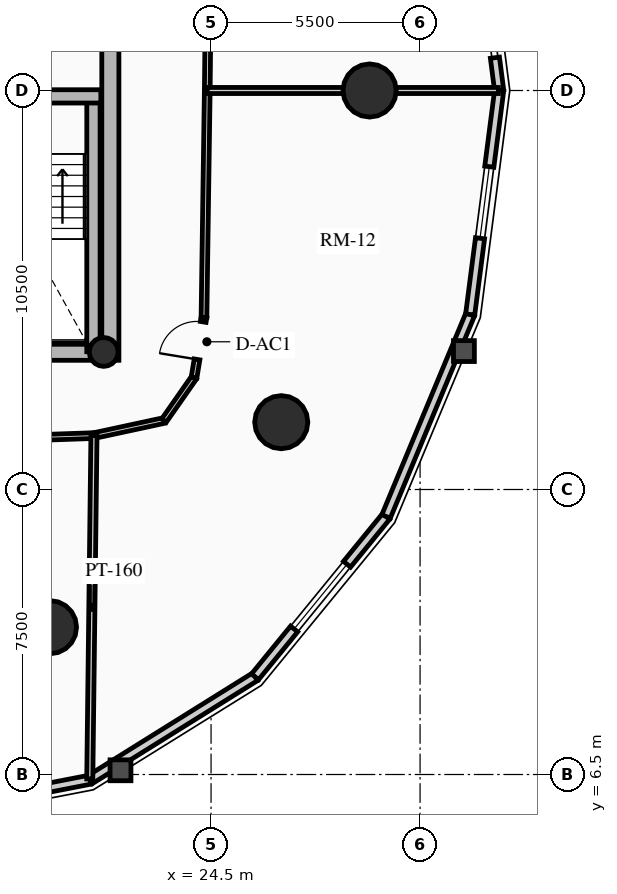
"""IFC4 building model, lengths in metres.
Left out: names, types, materials, properties, quantities, classifications, styles, units other than length and angle.
Written with IfcOpenShell. Run it as: python <this file> out.ifc"""

import sys

from ifc_helpers import new_model, si_unit, direction, frame, frame_2d, origin, origin_2d, place, context, subcontext, project, spatial, rectangle, circle, hollow_circle, extrude, source, transform, mapped, element, fill, save


model = new_model("IFC4")
c1 = context("Model", 3, precision=1e-05, world=origin(), true_north=direction((0.0, 1.0)))
c2 = subcontext(c1, "Body", "Model", "MODEL_VIEW")
j1 = project(units=[si_unit("LENGTHUNIT", "METRE"), si_unit("PLANEANGLEUNIT", "RADIAN")], contexts=[c1])
p1 = place(None, origin())
s1 = spatial("IfcSite", under=j1, at=p1, CompositionType="ELEMENT")
p2 = place(p1, origin())
s2 = spatial("IfcBuilding", under=s1, at=p2, CompositionType="ELEMENT")
p3 = place(p2, frame((0.0, 0.0, 73.06)))
s3 = spatial("IfcBuildingStorey", under=s2, at=p3, CompositionType="ELEMENT", Elevation=73.06)
p4 = place(p3, frame((21.85, 17.4, 0.0), z_axis=(0.0, 0.0, 1.0), x_axis=(0.0, 1.0, 0.0)))
e1 = element("IfcWall", 1, at=p4, inside=s3, PredefinedType="SHEAR", context=c2, shape_type="SweptSolid", body=[
    extrude(rectangle(XDim=14.2, YDim=0.45, at=frame_2d((7.1, 0.0))), origin(), (0.0, 0.0, 1.0), 2.91),
])
p5 = place(p3, frame((11.15, 17.625, 0.0), z_axis=(0.0, 0.0, 1.0), x_axis=(1.0, 0.0, 0.0)))
e2 = element("IfcWall", 2, at=p5, inside=s3, PredefinedType="SHEAR", context=c2, shape_type="SweptSolid", body=[
    extrude(rectangle(XDim=10.7, YDim=0.45, at=frame_2d((5.35, 0.0))), origin(), (0.0, 0.0, 1.0), 2.91),
])
m1 = source(origin(), c2, "Body", "SweptSolid", [
    extrude(rectangle(XDim=1.5, YDim=2.02, at=frame_2d((0.75, 1.01))), frame((0.0, 0.235, 0.0), z_axis=(0.0, -1.0, 0.0), x_axis=(1.0, 0.0, 0.0)), (0.0, 0.0, 1.0), 0.47),
])
p6 = place(p5, frame((5.45, 0.0, 0.0)))
e3 = element("IfcOpeningElement", 3, at=p6, cuts=e2, PredefinedType="OPENING", context=c2, shape_type="MappedRepresentation", body=[
    mapped(m1, transform((0.0, 0.0, 0.0), x_axis=(1.0, 0.0, 0.0), y_axis=(0.0, 1.0, 0.0), z_axis=(0.0, 0.0, 1.0), scale=1.0)),
])
p7 = place(p3, frame((21.405, 17.625, 0.0), z_axis=(0.0, 0.0, 1.0), x_axis=(0.0, 1.0, 0.0)))
e4 = element("IfcWall", 4, at=p7, inside=s3, PredefinedType="SHEAR", context=c2, shape_type="SweptSolid", body=[
    extrude(rectangle(XDim=6.72, YDim=0.35, at=frame_2d((3.36, 0.0))), origin(), (0.0, 0.0, 1.0), 2.91),
])
p8 = place(p3, frame((18.315, 24.345, 0.0), z_axis=(0.0, 0.0, 1.0), x_axis=(1.0, 0.0, 0.0)))
e5 = element("IfcWall", 5, at=p8, inside=s3, PredefinedType="SHEAR", context=c2, shape_type="SweptSolid", body=[
    extrude(rectangle(XDim=3.285, YDim=0.35, at=frame_2d((1.643, 0.0))), origin(), (0.0, 0.0, 1.0), 2.91),
])
p9 = place(p3, frame((21.675, 17.62, 0.0), z_axis=(0.0, 0.0, 1.0), x_axis=(1.0, 0.0, 0.0)))
e6 = element("IfcColumn", 6, at=p9, inside=s3, PredefinedType="COLUMN", context=c2, shape_type="SweptSolid", body=[
    extrude(hollow_circle(Radius=0.38, WallThickness=0.032, at=origin_2d()), origin(), (0.0, 0.0, 1.0), 2.91),
])
for number, where, z_axis, x_axis in (
    (7, (28.672, 24.5, 0.0), (0.0, 0.0, 1.0), (1.0, 0.0, 0.0)),
    (8, (20.261, 10.377, 0.0), (0.0, 0.0, 1.0), (1.0, 0.0, 0.0)),
    (9, (26.347, 15.771, 0.0), (0.0, 0.0, 1.0), (1.0, 0.0, 0.0)),
):
    element("IfcColumn", number, at=place(p3, frame(where, z_axis=z_axis, x_axis=x_axis)), inside=s3, PredefinedType="USERDEFINED", context=c2, shape_type="SweptSolid", body=[
        extrude(circle(Radius=0.7, at=origin_2d()), origin(), (0.0, 0.0, 1.0), 2.91),
    ])
p10 = place(p3, frame((31.969, 25.363, 0.0), z_axis=(0.0, 0.0, 1.0), x_axis=(0.128523364007, -0.991706481225, 0.0)))
e10 = element("IfcWall", 10, at=p10, inside=s3, PredefinedType="SOLIDWALL", context=c2, shape_type="SweptSolid", body=[
    extrude(rectangle(XDim=0.87, YDim=0.24, at=frame_2d((0.435, 0.0))), origin(), (0.0, 0.0, 1.0), 2.655),
])
p11 = place(p3, frame((21.315, 6.363, 0.0), z_axis=(0.0, 0.0, 1.0), x_axis=(-0.981723785992, -0.190311344954, 0.0)))
e11 = element("IfcWall", 11, at=p11, inside=s3, PredefinedType="SOLIDWALL", context=c2, shape_type="SweptSolid", body=[
    extrude(rectangle(XDim=4.904, YDim=0.24, at=frame_2d((2.452, 0.0))), origin(), (0.0, 0.0, 1.0), 2.179),
])
m2 = source(origin(), c2, "Body", "SweptSolid", [
    extrude(rectangle(XDim=1.9, YDim=1.35, at=frame_2d((0.95, 0.675))), frame((0.0, 0.13, 0.0), z_axis=(0.0, -1.0, 0.0), x_axis=(1.0, 0.0, 0.0)), (0.0, 0.0, 1.0), 0.26),
])
p12 = place(p11, frame((1.502, 0.0, 0.65)))
e12 = element("IfcOpeningElement", 12, at=p12, cuts=e11, PredefinedType="OPENING", context=c2, shape_type="MappedRepresentation", body=[
    mapped(m2, transform((0.0, 0.0, 0.0), x_axis=(1.0, 0.0, 0.0), y_axis=(0.0, 1.0, 0.0), z_axis=(0.0, 0.0, 1.0), scale=1.0)),
])
p13 = place(p3, frame((25.658, 9.072, 0.0), z_axis=(0.0, 0.0, 1.0), x_axis=(-0.848520380187, -0.529162701263, 0.0)))
e13 = element("IfcWall", 13, at=p13, inside=s3, PredefinedType="SOLIDWALL", context=c2, shape_type="SweptSolid", body=[
    extrude(rectangle(XDim=5.119, YDim=0.24, at=frame_2d((2.56, 0.0))), origin(), (0.0, 0.0, 1.0), 2.179),
])
p14 = place(p3, frame((29.105, 13.291, 0.0), z_axis=(0.0, 0.0, 1.0), x_axis=(-0.632700781152, -0.77439635945, 0.0)))
e14 = element("IfcWall", 14, at=p14, inside=s3, PredefinedType="SOLIDWALL", context=c2, shape_type="SweptSolid", body=[
    extrude(rectangle(XDim=5.448, YDim=0.24, at=frame_2d((2.724, 0.0))), origin(), (0.0, 0.0, 1.0), 2.179),
])
m3 = source(origin(), c2, "Body", "SweptSolid", [
    extrude(rectangle(XDim=2.2, YDim=1.35, at=frame_2d((1.1, 0.675))), frame((0.0, 0.13, 0.0), z_axis=(0.0, -1.0, 0.0), x_axis=(1.0, 0.0, 0.0)), (0.0, 0.0, 1.0), 0.26),
])
p15 = place(p14, frame((1.624, 0.0, 0.65)))
e15 = element("IfcOpeningElement", 15, at=p15, cuts=e14, PredefinedType="OPENING", context=c2, shape_type="MappedRepresentation", body=[
    mapped(m3, transform((0.0, 0.0, 0.0), x_axis=(1.0, 0.0, 0.0), y_axis=(0.0, 1.0, 0.0), z_axis=(0.0, 0.0, 1.0), scale=1.0)),
])
p16 = place(p3, frame((31.318, 18.607, 0.0), z_axis=(0.0, 0.0, 1.0), x_axis=(-0.384344417632, -0.923189779317, 0.0)))
e16 = element("IfcWall", 16, at=p16, inside=s3, PredefinedType="SOLIDWALL", context=c2, shape_type="SweptSolid", body=[
    extrude(rectangle(XDim=5.758, YDim=0.24, at=frame_2d((2.879, 0.0))), origin(), (0.0, 0.0, 1.0), 2.179),
])
p17 = place(p3, frame((32.081, 24.5, 0.0), z_axis=(0.0, 0.0, 1.0), x_axis=(-0.128351991996, -0.991728675672, 0.0)))
e17 = element("IfcWall", 17, at=p17, inside=s3, PredefinedType="SOLIDWALL", context=c2, shape_type="SweptSolid", body=[
    extrude(rectangle(XDim=5.942, YDim=0.24, at=frame_2d((2.971, 0.0))), origin(), (0.0, 0.0, 1.0), 2.179),
])
p18 = place(p17, frame((2.021, 0.0, 0.65)))
e18 = element("IfcOpeningElement", 18, at=p18, cuts=e17, PredefinedType="OPENING", context=c2, shape_type="MappedRepresentation", body=[
    mapped(m2, transform((0.0, 0.0, 0.0), x_axis=(1.0, 0.0, 0.0), y_axis=(0.0, 1.0, 0.0), z_axis=(0.0, 0.0, 1.0), scale=1.0)),
])
p19 = place(p3, frame((24.4, 24.5, 0.0), z_axis=(0.0, 0.0, 1.0), x_axis=(0.011359710161, 0.999935476411, 0.0)))
e19 = element("IfcWall", 19, at=p19, inside=s3, PredefinedType="PARTITIONING", context=c2, shape_type="SweptSolid", body=[
    extrude(rectangle(XDim=6.082, YDim=0.15, at=frame_2d((3.041, 0.0))), origin(), (0.0, 0.0, 1.0), 2.225),
])
p20 = place(p3, frame((14.781, 15.191, 0.0), z_axis=(0.0, 0.0, 1.0), x_axis=(0.999412963972, 0.034259705842, 0.0)))
e20 = element("IfcWall", 20, at=p20, inside=s3, PredefinedType="PARTITIONING", context=c2, shape_type="SweptSolid", body=[
    extrude(rectangle(XDim=6.642, YDim=0.15, at=frame_2d((3.321, 0.0))), origin(), (0.0, 0.0, 1.0), 2.225),
])
p21 = place(p3, frame((21.419, 15.418, 0.0), z_axis=(0.0, 0.0, 1.0), x_axis=(0.977540384091, 0.210748184977, 0.0)))
e21 = element("IfcWall", 21, at=p21, inside=s3, PredefinedType="PARTITIONING", context=c2, shape_type="SweptSolid", body=[
    extrude(rectangle(XDim=1.887, YDim=0.15, at=frame_2d((0.944, 0.0))), origin(), (0.0, 0.0, 1.0), 2.225),
])
p22 = place(p3, frame((23.263, 15.816, 0.0), z_axis=(0.0, 0.0, 1.0), x_axis=(0.572652947117, 0.819797903241, 0.0)))
e22 = element("IfcWall", 22, at=p22, inside=s3, PredefinedType="PARTITIONING", context=c2, shape_type="SweptSolid", body=[
    extrude(rectangle(XDim=1.377, YDim=0.15, at=frame_2d((0.688, 0.0))), origin(), (0.0, 0.0, 1.0), 2.225),
])
p23 = place(p3, frame((24.052, 16.945, 0.0), z_axis=(0.0, 0.0, 1.0), x_axis=(0.162869842843, 0.986647563364, 0.0)))
e23 = element("IfcWall", 23, at=p23, inside=s3, PredefinedType="PARTITIONING", context=c2, shape_type="SweptSolid", body=[
    extrude(rectangle(XDim=1.605, YDim=0.15, at=frame_2d((0.803, 0.0))), origin(), (0.0, 0.0, 1.0), 2.225),
])
m4 = source(origin(), c2, "Body", "SweptSolid", [
    extrude(rectangle(XDim=1.0, YDim=2.015, at=frame_2d((0.5, 1.007))), frame((0.0, 0.085, 0.0), z_axis=(0.0, -1.0, 0.0), x_axis=(1.0, 0.0, 0.0)), (0.0, 0.0, 1.0), 0.17),
])
p24 = place(p23, frame((0.485, 0.0, 0.0)))
e24 = element("IfcOpeningElement", 24, at=p24, cuts=e23, PredefinedType="OPENING", context=c2, shape_type="MappedRepresentation", body=[
    mapped(m4, transform((0.0, 0.0, 0.0), x_axis=(1.0, 0.0, 0.0), y_axis=(0.0, 1.0, 0.0), z_axis=(0.0, 0.0, 1.0), scale=1.0)),
])
p25 = place(p3, frame((24.313, 18.529, 0.0), z_axis=(0.0, 0.0, 1.0), x_axis=(0.014472275982, 0.99989527113, 0.0)))
e25 = element("IfcWall", 25, at=p25, inside=s3, PredefinedType="PARTITIONING", context=c2, shape_type="SweptSolid", body=[
    extrude(rectangle(XDim=5.972, YDim=0.15, at=frame_2d((2.986, 0.0))), origin(), (0.0, 0.0, 1.0), 2.655),
])
p26 = place(p3, frame((24.4, 24.5, 0.0), z_axis=(0.0, 0.0, 1.0), x_axis=(1.0, 0.0, 0.0)))
e26 = element("IfcWall", 26, at=p26, inside=s3, PredefinedType="PARTITIONING", context=c2, shape_type="SweptSolid", body=[
    extrude(rectangle(XDim=7.661, YDim=0.16, at=frame_2d((3.831, 0.0))), origin(), (0.0, 0.0, 1.0), 2.179),
])
p27 = place(p3, frame((21.419, 15.418, 0.0), z_axis=(0.0, 0.0, 1.0), x_axis=(-0.012184661849, -0.999925764252, 0.0)))
e27 = element("IfcWall", 27, at=p27, inside=s3, PredefinedType="PARTITIONING", context=c2, shape_type="SweptSolid", body=[
    extrude(rectangle(XDim=9.037, YDim=0.16, at=frame_2d((4.518, 0.0))), origin(), (0.0, 0.0, 1.0), 2.179),
])
m5 = source(origin(), c2, "Body", "SweptSolid", [
    extrude(rectangle(XDim=2.2, YDim=1.35, at=frame_2d((1.1, 0.675))), frame((0.0, 0.03, 0.0), z_axis=(0.0, -1.0, 0.0), x_axis=(1.0, 0.0, 0.0)), (0.0, 0.0, 1.0), 0.06),
])
p28 = place(p15, origin())
e28 = element("IfcWindow", 28, at=p28, inside=s3, PartitioningType="DOUBLE_PANEL_VERTICAL", PredefinedType="WINDOW", context=c2, shape_type="MappedRepresentation", body=[
    mapped(m5, transform((0.0, 0.0, 0.0), x_axis=(1.0, 0.0, 0.0), y_axis=(0.0, 1.0, 0.0), z_axis=(0.0, 0.0, 1.0), scale=1.0)),
])
fill(e15, e28)
m6 = source(origin(), c2, "Body", "SweptSolid", [
    extrude(rectangle(XDim=1.9, YDim=1.35, at=frame_2d((0.95, 0.675))), frame((0.0, 0.03, 0.0), z_axis=(0.0, -1.0, 0.0), x_axis=(1.0, 0.0, 0.0)), (0.0, 0.0, 1.0), 0.06),
])
p29 = place(p18, origin())
e29 = element("IfcWindow", 29, at=p29, inside=s3, PartitioningType="DOUBLE_PANEL_VERTICAL", PredefinedType="WINDOW", context=c2, shape_type="MappedRepresentation", body=[
    mapped(m6, transform((0.0, 0.0, 0.0), x_axis=(1.0, 0.0, 0.0), y_axis=(0.0, 1.0, 0.0), z_axis=(0.0, 0.0, 1.0), scale=1.0)),
])
fill(e18, e29)
m7 = source(origin(), c2, "Body", "SweptSolid", [
    extrude(rectangle(XDim=1.0, YDim=2.015, at=frame_2d((0.5, 1.007))), frame((0.0, 0.025, 0.0), z_axis=(0.0, -1.0, 0.0), x_axis=(1.0, 0.0, 0.0)), (0.0, 0.0, 1.0), 0.05),
])
p30 = place(p24, origin())
e30 = element("IfcDoor", 30, at=p30, inside=s3, OperationType="SINGLE_SWING_LEFT", PredefinedType="DOOR", context=c2, shape_type="MappedRepresentation", body=[
    mapped(m7, transform((0.0, 0.0, 0.0), x_axis=(1.0, 0.0, 0.0), y_axis=(0.0, 1.0, 0.0), z_axis=(0.0, 0.0, 1.0), scale=1.0)),
])
fill(e24, e30)
save(model, sys.argv[1])
